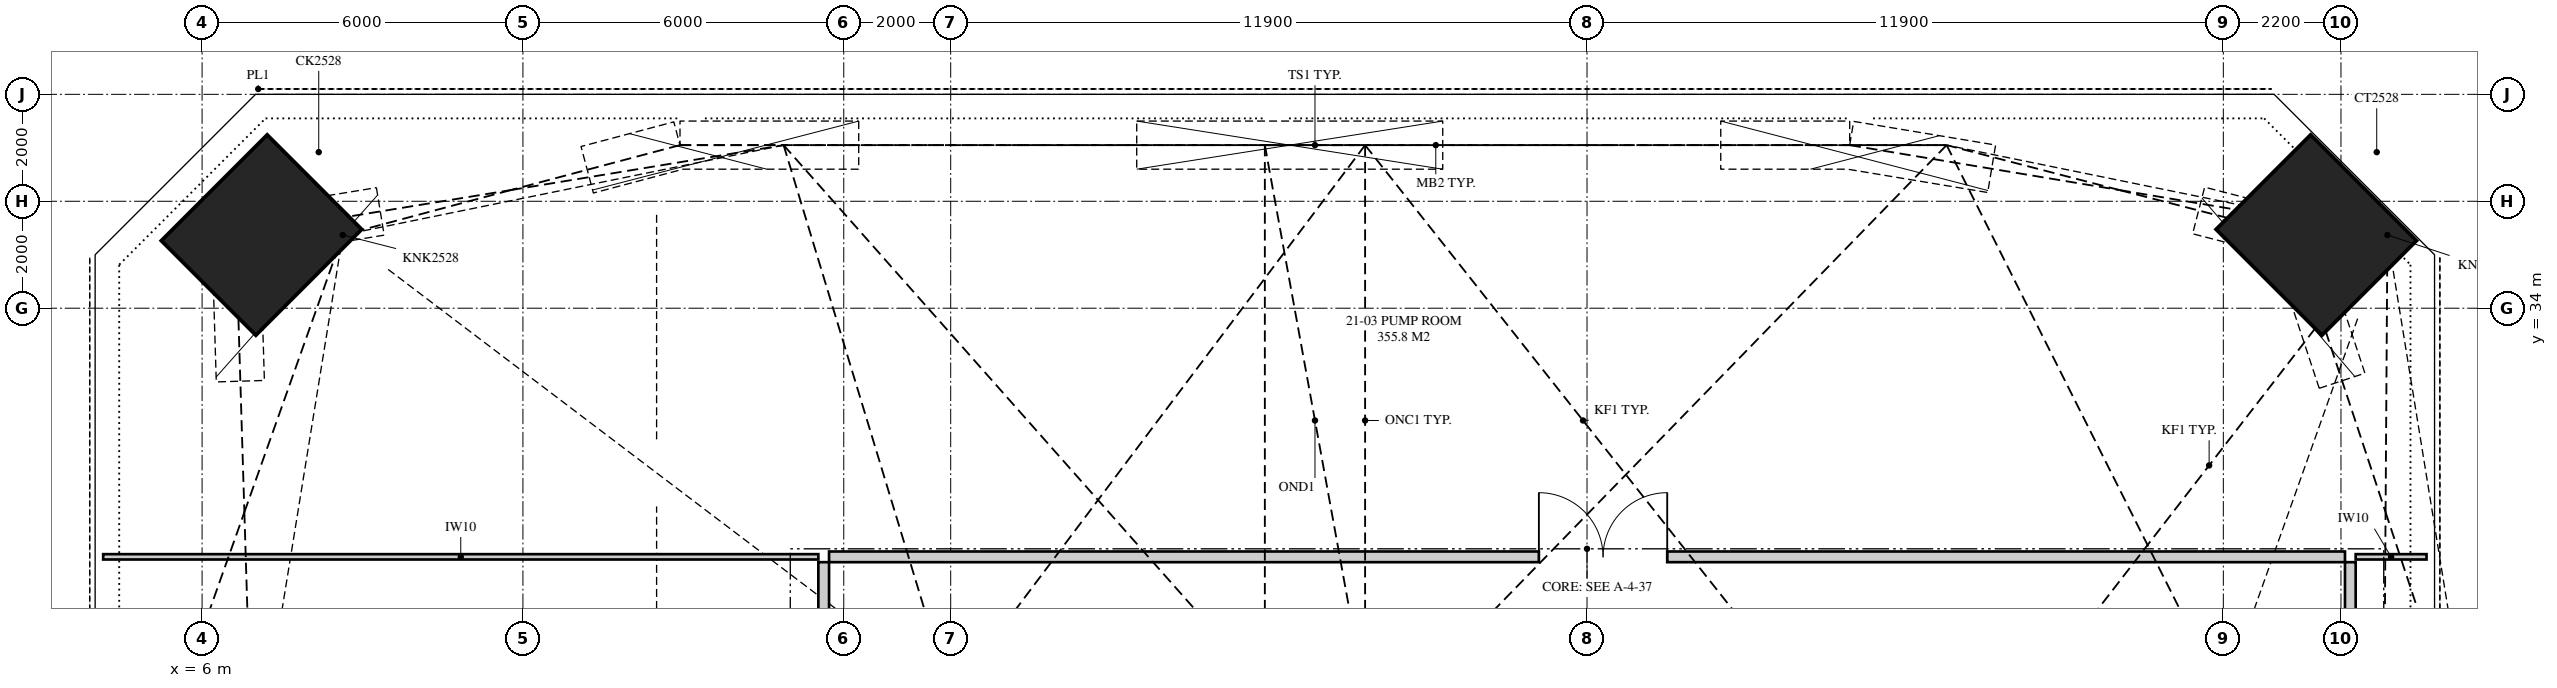
"""IFC4 building model, lengths in metres.
Left out: names, types, materials, properties, quantities, classifications, styles, units other than length and angle.
Written with IfcOpenShell. Run it as: python <this file> out.ifc"""

import sys

from ifc_helpers import new_model, si_unit, direction, frame, frame_2d, origin, origin_2d, place, context, subcontext, project, spatial, polyline, rectangle, hollow_rectangle, outline, extrude, element, fill, save


model = new_model("IFC4")
c1 = context("Model", 3, precision=1e-05, world=origin(), true_north=direction((0.0, 1.0)))
c2 = subcontext(c1, "Body", "Model", "MODEL_VIEW")
j1 = project(units=[si_unit("LENGTHUNIT", "METRE"), si_unit("PLANEANGLEUNIT", "RADIAN")], contexts=[c1])
p1 = place(None, origin())
s1 = spatial("IfcSite", under=j1, at=p1, CompositionType="ELEMENT")
p2 = place(p1, origin())
s2 = spatial("IfcBuilding", under=s1, at=p2, CompositionType="ELEMENT")
p3 = place(p2, frame((0.0, 0.0, 79.75)))
s3 = spatial("IfcBuildingStorey", under=s2, at=p3, CompositionType="ELEMENT", Elevation=79.75)
p4 = place(p3, frame((45.119, 35.369, 0.0), z_axis=(0.330350424728, 0.0, 0.943858356366), x_axis=(-0.647863070943, -0.727225506888, 0.22675207483)))
e1 = element("IfcColumn", 1, at=p4, inside=s3, PredefinedType="COLUMN", context=c2, shape_type="SweptSolid", body=[
    extrude(hollow_rectangle(XDim=2.5, YDim=2.8, WallThickness=0.25, at=origin_2d()), origin(), (0.0, 0.0, 1.0), 4.641),
])
p5 = place(p3, frame((6.631, 35.369, 0.0), z_axis=(0.371390676354, 0.0, 0.928476690885), x_axis=(0.631748504238, -0.732827974204, -0.252699401695)))
e2 = element("IfcColumn", 2, at=p5, inside=s3, PredefinedType="COLUMN", context=c2, shape_type="SweptSolid", body=[
    extrude(hollow_rectangle(XDim=2.5, YDim=2.8, WallThickness=0.175, at=origin_2d()), origin(), (0.0, 0.0, 1.0), 4.635),
])
p6 = place(p3, frame((17.725, 29.35, 0.0), z_axis=(0.0, 0.0, 1.0), x_axis=(1.0, 0.0, 0.0)))
e3 = element("IfcWall", 3, at=p6, inside=s3, PredefinedType="PARTITIONING", context=c2, shape_type="SweptSolid", body=[
    extrude(outline(polyline([(28.35, 0.0), (28.35, 4.72), (27.567, 4.72), (27.567, 3.22), (26.434, 3.22), (26.434, 4.72), (25.083, 4.72), (25.083, 4.141), (24.111, 4.141), (24.111, 4.72), (16.498, 4.72), (16.498, 4.141), (15.737, 4.141), (15.737, 4.72), (13.833, 4.72), (13.833, 4.141), (12.979, 4.141), (12.979, 4.72), (10.314, 4.72), (10.314, 4.194), (9.736, 4.194), (9.736, 4.72), (6.376, 4.72), (6.376, 4.141), (5.567, 4.141), (5.567, 4.72), (4.602, 4.72), (4.602, 4.141), (3.861, 4.141), (3.861, 4.72), (1.763, 4.72), (1.763, 4.141), (1.209, 4.141), (1.209, 4.72), (0.0, 4.72), (0.0, 0.0), (28.35, 0.0)]), holes=[polyline([(9.234, 3.349), (9.274, 3.453), (9.869, 3.504), (9.869, 2.988), (9.83, 2.883), (9.234, 2.832), (9.234, 3.349)])]), frame((0.0, 0.1, 0.0), z_axis=(0.0, -1.0, 0.0), x_axis=(1.0, 0.0, 0.0)), (0.0, 0.0, 1.0), 0.2),
])
p7 = place(p6, frame((13.275, 0.0, 0.0)))
e4 = element("IfcOpeningElement", 4, at=p7, cuts=e3, PredefinedType="OPENING", context=c2, shape_type="SweptSolid", body=[
    extrude(rectangle(XDim=2.4, YDim=2.4, at=frame_2d((1.2, 1.2))), frame((0.0, 0.11, 0.0), z_axis=(0.0, -1.0, 0.0), x_axis=(1.0, 0.0, 0.0)), (0.0, 0.0, 1.0), 0.22),
])
p8 = place(p3, frame((17.625, 27.7, 0.0), z_axis=(0.0, 0.0, 1.0), x_axis=(0.0, 1.0, 0.0)))
e5 = element("IfcWall", 5, at=p8, inside=s3, PredefinedType="PARTITIONING", context=c2, shape_type="SweptSolid", body=[
    extrude(outline(polyline([(0.0, 0.0), (1.55, 0.0), (1.55, 3.22), (0.147, 3.22), (0.147, 4.72), (0.0, 4.72), (0.0, 0.0)])), frame((0.0, 0.1, 0.0), z_axis=(0.0, -1.0, 0.0), x_axis=(1.0, 0.0, 0.0)), (0.0, 0.0, 1.0), 0.2),
])
p9 = place(p3, frame((46.175, 27.7, 0.0), z_axis=(0.0, 0.0, 1.0), x_axis=(0.0, 1.0, 0.0)))
e6 = element("IfcWall", 6, at=p9, inside=s3, PredefinedType="PARTITIONING", context=c2, shape_type="SweptSolid", body=[
    extrude(rectangle(XDim=1.55, YDim=0.2, at=frame_2d((0.775, 0.0))), origin(), (0.0, 0.0, 1.0), 4.72),
])
p10 = place(p3, frame((4.15, 29.35, 0.0), z_axis=(0.0, 0.0, 1.0), x_axis=(1.0, 0.0, 0.0)))
e7 = element("IfcWall", 7, at=p10, inside=s3, PredefinedType="PARTITIONING", context=c2, shape_type="SweptSolid", body=[
    extrude(outline(polyline([(2.634, 4.72), (0.0, 4.72), (0.0, 0.0), (13.375, 0.0), (13.375, 4.72), (13.314, 4.72), (13.314, 3.22), (11.527, 3.22), (11.527, 4.12), (9.09, 4.12), (9.09, 4.72), (4.377, 4.72), (4.377, 2.9), (2.634, 2.9), (2.634, 4.72)]), holes=[polyline([(2.757, 0.815), (1.892, 0.692), (1.892, 1.577), (1.932, 1.628), (2.255, 1.674), (2.255, 2.389), (2.258, 2.444), (3.078, 2.456), (3.078, 1.567), (3.074, 1.512), (2.797, 1.508), (2.797, 0.867), (2.757, 0.815)])]), frame((0.0, 0.05, 0.0), z_axis=(0.0, -1.0, 0.0), x_axis=(1.0, 0.0, 0.0)), (0.0, 0.0, 1.0), 0.1),
])
p11 = place(p3, frame((46.275, 29.35, 0.0), z_axis=(0.0, 0.0, 1.0), x_axis=(1.0, 0.0, 0.0)))
e8 = element("IfcWall", 8, at=p11, inside=s3, PredefinedType="PARTITIONING", context=c2, shape_type="SweptSolid", body=[
    extrude(outline(polyline([(0.698, 4.72), (0.0, 4.72), (0.0, 0.0), (1.325, 0.0), (1.325, 1.452), (0.964, 1.452), (0.964, 0.806), (0.963, 0.751), (0.143, 0.749), (0.143, 1.637), (0.144, 1.692), (0.387, 1.693), (0.387, 2.337), (0.425, 2.389), (1.283, 2.505), (1.325, 2.505), (1.325, 2.9), (0.698, 2.9), (0.698, 4.72)])), frame((0.0, 0.05, 0.0), z_axis=(0.0, -1.0, 0.0), x_axis=(1.0, 0.0, 0.0)), (0.0, 0.0, 1.0), 0.1),
])
p12 = place(p7, origin())
e9 = element("IfcDoor", 9, at=p12, inside=s3, OperationType="DOUBLE_DOOR_SINGLE_SWING", PredefinedType="DOOR", context=c2, shape_type="SweptSolid", body=[
    extrude(rectangle(XDim=2.4, YDim=2.4, at=frame_2d((1.2, 1.2))), frame((0.0, 0.025, 0.0), z_axis=(0.0, -1.0, 0.0), x_axis=(1.0, 0.0, 0.0)), (0.0, 0.0, 1.0), 0.05),
])
fill(e4, e9)
save(model, sys.argv[1])
